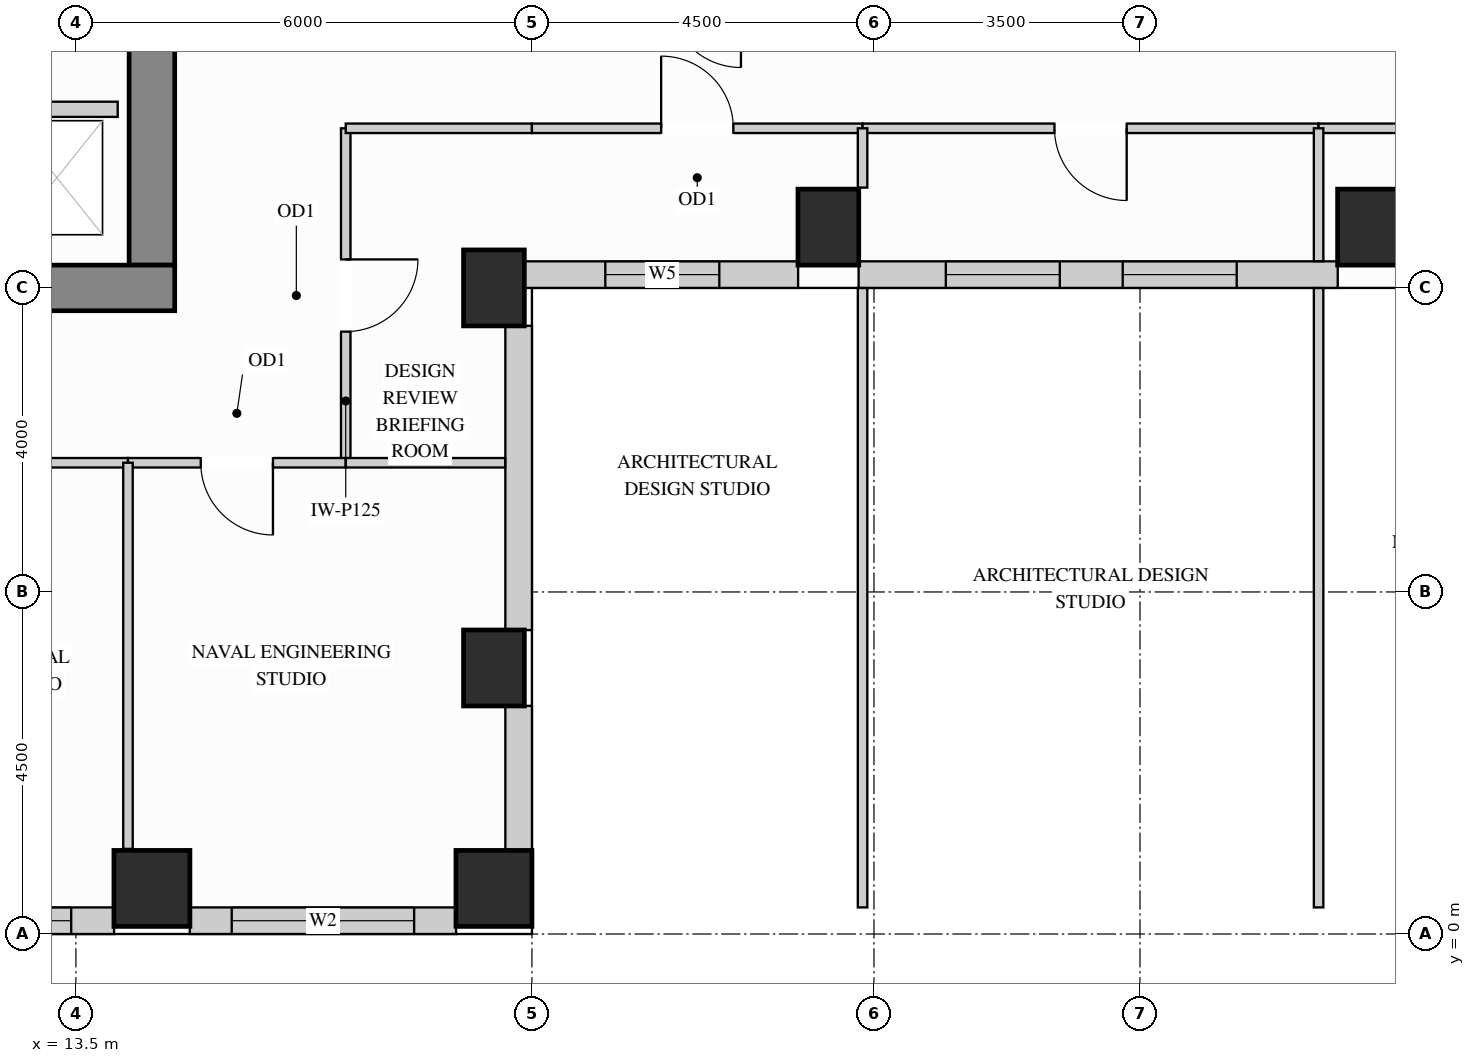
"""IFC4 building model, lengths in metres.
Left out: names, types, materials, properties, quantities, classifications, styles, units other than length and angle.
Written with IfcOpenShell. Run it as: python <this file> out.ifc"""

import sys

from ifc_helpers import new_model, si_unit, direction, frame, frame_2d, origin, origin_2d, place, context, subcontext, project, spatial, rectangle, extrude, source, transform, mapped, element, fill, save


model = new_model("IFC4")
c1 = context("Model", 3, precision=1e-05, world=origin(), true_north=direction((0.0, 1.0)))
c2 = subcontext(c1, "Body", "Model", "MODEL_VIEW")
j1 = project(units=[si_unit("LENGTHUNIT", "METRE"), si_unit("PLANEANGLEUNIT", "RADIAN")], contexts=[c1])
p1 = place(None, origin())
s1 = spatial("IfcSite", under=j1, at=p1, CompositionType="ELEMENT")
p2 = place(p1, origin())
s2 = spatial("IfcBuilding", under=s1, at=p2, CompositionType="ELEMENT")
p3 = place(p2, frame((0.0, 0.0, 175.5)))
s3 = spatial("IfcBuildingStorey", under=s2, at=p3, CompositionType="ELEMENT", Elevation=175.5)
m1 = source(origin(), c2, "Body", "SweptSolid", [
    extrude(rectangle(XDim=0.8, YDim=1.0, at=origin_2d()), origin(), (0.0, 0.0, 1.0), 3.4),
])
for number, where, z_axis, x_axis in (
    (1, (19.0, 3.5, 0.0), (0.0, 0.0, 1.0), (1.0, 0.0, 0.0)),
    (2, (19.0, 8.5, 0.0), (0.0, 0.0, 1.0), (1.0, 0.0, 0.0)),
    (3, (23.4, 9.3, 0.0), (0.0, 0.0, 1.0), (1.0, 0.0, 0.0)),
    (4, (30.5, 9.3, 0.0), (0.0, 0.0, 1.0), (1.0, 0.0, 0.0)),
):
    element("IfcColumn", number, at=place(p3, frame(where, z_axis=z_axis, x_axis=x_axis)), inside=s3, PredefinedType="COLUMN", context=c2, shape_type="MappedRepresentation", body=[
        mapped(m1, transform((0.0, 0.0, 0.0), x_axis=(1.0, 0.0, 0.0), y_axis=(0.0, 1.0, 0.0), z_axis=(0.0, 0.0, 1.0))),
    ])
m2 = source(origin(), c2, "Body", "SweptSolid", [
    extrude(rectangle(XDim=1.0, YDim=1.0, at=origin_2d()), origin(), (0.0, 0.0, 1.0), 3.4),
])
for number, where, z_axis, x_axis in (
    (5, (14.5, 0.6, 0.0), (0.0, 0.0, 1.0), (1.0, 0.0, 0.0)),
    (6, (19.0, 0.6, 0.0), (0.0, 0.0, 1.0), (1.0, 0.0, 0.0)),
):
    element("IfcColumn", number, at=place(p3, frame(where, z_axis=z_axis, x_axis=x_axis)), inside=s3, PredefinedType="COLUMN", context=c2, shape_type="MappedRepresentation", body=[
        mapped(m2, transform((0.0, 0.0, 0.0), x_axis=(1.0, 0.0, 0.0), y_axis=(0.0, 1.0, 0.0), z_axis=(0.0, 0.0, 1.0))),
    ])
m3 = source(origin(), c2, "Body", "SweptSolid", [
    extrude(rectangle(XDim=10.02, YDim=0.6, at=frame_2d((5.01, 0.0))), origin(), (0.0, 0.0, 1.0), 3.4),
])
p4 = place(p3, frame((14.5, 8.8, 0.0), z_axis=(0.0, 0.0, 1.0), x_axis=(0.0, 1.0, 0.0)))
e7 = element("IfcWall", 7, at=p4, inside=s3, PredefinedType="SHEAR", context=c2, shape_type="MappedRepresentation", body=[
    mapped(m3, transform((0.0, 0.0, 0.0), x_axis=(1.0, 0.0, 0.0), y_axis=(0.0, 1.0, 0.0), z_axis=(0.0, 0.0, 1.0))),
])
m4 = source(origin(), c2, "Body", "SweptSolid", [
    extrude(rectangle(XDim=10.6, YDim=0.6, at=frame_2d((5.3, 0.0))), origin(), (0.0, 0.0, 1.0), 3.4),
])
p5 = place(p3, frame((4.2, 8.5, 0.0), z_axis=(0.0, 0.0, 1.0), x_axis=(1.0, 0.0, 0.0)))
e8 = element("IfcWall", 8, at=p5, inside=s3, PredefinedType="SHEAR", context=c2, shape_type="MappedRepresentation", body=[
    mapped(m4, transform((0.0, 0.0, 0.0), x_axis=(1.0, 0.0, 0.0), y_axis=(0.0, 1.0, 0.0), z_axis=(0.0, 0.0, 1.0))),
])
p6 = place(p3, frame((9.498, 0.175, 0.0), z_axis=(0.0, 0.0, 1.0), x_axis=(1.0, 0.0, 0.0)))
e9 = element("IfcWall", 9, at=p6, inside=s3, PredefinedType="SOLIDWALL", context=c2, shape_type="SweptSolid", body=[
    extrude(rectangle(XDim=4.504, YDim=0.35, at=frame_2d((2.252, 0.0))), origin(), (0.0, 0.0, 1.0), 2.612),
])
p7 = place(p6, frame((1.54, 0.0, 0.78)))
e10 = element("IfcOpeningElement", 10, at=p7, cuts=e9, PredefinedType="OPENING", context=c2, shape_type="SweptSolid", body=[
    extrude(rectangle(XDim=2.4, YDim=1.652, at=frame_2d((1.2, 0.826))), frame((0.0, 0.185, 0.0), z_axis=(0.0, -1.0, 0.0), x_axis=(1.0, 0.0, 0.0)), (0.0, 0.0, 1.0), 0.37),
])
p8 = place(p3, frame((14.998, 0.175, 0.0), z_axis=(0.0, 0.0, 1.0), x_axis=(1.0, 0.0, 0.0)))
e11 = element("IfcWall", 11, at=p8, inside=s3, PredefinedType="SOLIDWALL", context=c2, shape_type="SweptSolid", body=[
    extrude(rectangle(XDim=3.504, YDim=0.35, at=frame_2d((1.752, 0.0))), origin(), (0.0, 0.0, 1.0), 2.612),
])
p9 = place(p8, frame((0.552, 0.0, 0.78)))
e12 = element("IfcOpeningElement", 12, at=p9, cuts=e11, PredefinedType="OPENING", context=c2, shape_type="SweptSolid", body=[
    extrude(rectangle(XDim=2.4, YDim=1.652, at=frame_2d((1.2, 0.826))), frame((0.0, 0.185, 0.0), z_axis=(0.0, -1.0, 0.0), x_axis=(1.0, 0.0, 0.0)), (0.0, 0.0, 1.0), 0.37),
])
m5 = source(origin(), c2, "Body", "SweptSolid", [
    extrude(rectangle(XDim=1.904, YDim=0.35, at=frame_2d((0.952, 0.0))), origin(), (0.0, 0.0, 1.0), 2.612),
])
p10 = place(p3, frame((19.325, 1.098, 0.0), z_axis=(0.0, 0.0, 1.0), x_axis=(0.0, 1.0, 0.0)))
e13 = element("IfcWall", 13, at=p10, inside=s3, PredefinedType="SOLIDWALL", context=c2, shape_type="MappedRepresentation", body=[
    mapped(m5, transform((0.0, 0.0, 0.0), x_axis=(1.0, 0.0, 0.0), y_axis=(0.0, 1.0, 0.0), z_axis=(0.0, 0.0, 1.0))),
])
m6 = source(origin(), c2, "Body", "SweptSolid", [
    extrude(rectangle(XDim=4.004, YDim=0.35, at=frame_2d((2.002, 0.0))), origin(), (0.0, 0.0, 1.0), 2.612),
])
p11 = place(p3, frame((19.325, 3.998, 0.0), z_axis=(0.0, 0.0, 1.0), x_axis=(0.0, 1.0, 0.0)))
e14 = element("IfcWall", 14, at=p11, inside=s3, PredefinedType="SOLIDWALL", context=c2, shape_type="MappedRepresentation", body=[
    mapped(m6, transform((0.0, 0.0, 0.0), x_axis=(1.0, 0.0, 0.0), y_axis=(0.0, 1.0, 0.0), z_axis=(0.0, 0.0, 1.0))),
])
p12 = place(p3, frame((19.398, 8.675, 0.0), z_axis=(0.0, 0.0, 1.0), x_axis=(1.0, 0.0, 0.0)))
e15 = element("IfcWall", 15, at=p12, inside=s3, PredefinedType="SOLIDWALL", context=c2, shape_type="SweptSolid", body=[
    extrude(rectangle(XDim=3.604, YDim=0.35, at=frame_2d((1.802, 0.0))), origin(), (0.0, 0.0, 1.0), 3.385),
])
p13 = place(p12, frame((1.067, 0.0, 0.78)))
e16 = element("IfcOpeningElement", 16, at=p13, cuts=e15, PredefinedType="OPENING", context=c2, shape_type="SweptSolid", body=[
    extrude(rectangle(XDim=1.5, YDim=2.0, at=frame_2d((0.75, 1.0))), frame((0.0, 0.185, 0.0), z_axis=(0.0, -1.0, 0.0), x_axis=(1.0, 0.0, 0.0)), (0.0, 0.0, 1.0), 0.37),
])
p14 = place(p3, frame((23.798, 8.675, 0.0), z_axis=(0.0, 0.0, 1.0), x_axis=(1.0, 0.0, 0.0)))
e17 = element("IfcWall", 17, at=p14, inside=s3, PredefinedType="SOLIDWALL", context=c2, shape_type="SweptSolid", body=[
    extrude(rectangle(XDim=6.304, YDim=0.35, at=frame_2d((3.152, 0.0))), origin(), (0.0, 0.0, 1.0), 3.385),
])
p15 = place(p14, frame((1.147, 0.0, 0.78)))
e18 = element("IfcOpeningElement", 18, at=p15, cuts=e17, PredefinedType="OPENING", context=c2, shape_type="SweptSolid", body=[
    extrude(rectangle(XDim=1.5, YDim=2.0, at=frame_2d((0.75, 1.0))), frame((0.0, 0.185, 0.0), z_axis=(0.0, -1.0, 0.0), x_axis=(1.0, 0.0, 0.0)), (0.0, 0.0, 1.0), 0.37),
])
p16 = place(p14, frame((3.475, 0.0, 0.78)))
e19 = element("IfcOpeningElement", 19, at=p16, cuts=e17, PredefinedType="OPENING", context=c2, shape_type="SweptSolid", body=[
    extrude(rectangle(XDim=1.5, YDim=2.0, at=frame_2d((0.75, 1.0))), frame((0.0, 0.185, 0.0), z_axis=(0.0, -1.0, 0.0), x_axis=(1.0, 0.0, 0.0)), (0.0, 0.0, 1.0), 0.37),
])
p17 = place(p3, frame((17.05, 6.2, 0.0), z_axis=(0.0, 0.0, 1.0), x_axis=(0.0, 1.0, 0.0)))
e20 = element("IfcWall", 20, at=p17, inside=s3, PredefinedType="PARTITIONING", context=c2, shape_type="SweptSolid", body=[
    extrude(rectangle(XDim=4.4, YDim=0.125, at=frame_2d((2.2, 0.0))), origin(), (0.0, 0.0, 1.0), 3.385),
])
p18 = place(p17, frame((1.725, 0.0, 0.0)))
e21 = element("IfcOpeningElement", 21, at=p18, cuts=e20, PredefinedType="OPENING", context=c2, shape_type="SweptSolid", body=[
    extrude(rectangle(XDim=0.95, YDim=2.15, at=frame_2d((0.475, 1.075))), frame((0.0, 0.073, 0.0), z_axis=(0.0, -1.0, 0.0), x_axis=(1.0, 0.0, 0.0)), (0.0, 0.0, 1.0), 0.145),
])
m7 = source(origin(), c2, "Body", "SweptSolid", [
    extrude(rectangle(XDim=2.45, YDim=0.125, at=frame_2d((1.225, 0.0))), origin(), (0.0, 0.0, 1.0), 3.385),
])
p19 = place(p3, frame((17.05, 10.6, 0.0), z_axis=(0.0, 0.0, 1.0), x_axis=(1.0, 0.0, 0.0)))
e22 = element("IfcWall", 22, at=p19, inside=s3, PredefinedType="PARTITIONING", context=c2, shape_type="MappedRepresentation", body=[
    mapped(m7, transform((0.0, 0.0, 0.0), x_axis=(1.0, 0.0, 0.0), y_axis=(0.0, 1.0, 0.0), z_axis=(0.0, 0.0, 1.0))),
])
p20 = place(p3, frame((19.5, 10.6, 0.0), z_axis=(0.0, 0.0, 1.0), x_axis=(1.0, 0.0, 0.0)))
e23 = element("IfcWall", 23, at=p20, inside=s3, PredefinedType="PARTITIONING", context=c2, shape_type="SweptSolid", body=[
    extrude(rectangle(XDim=4.35, YDim=0.125, at=frame_2d((2.175, 0.0))), origin(), (0.0, 0.0, 1.0), 3.385),
])
p21 = place(p20, frame((1.7, 0.0, 0.0)))
e24 = element("IfcOpeningElement", 24, at=p21, cuts=e23, PredefinedType="OPENING", context=c2, shape_type="SweptSolid", body=[
    extrude(rectangle(XDim=0.95, YDim=2.15, at=frame_2d((0.475, 1.075))), frame((0.0, 0.073, 0.0), z_axis=(0.0, -1.0, 0.0), x_axis=(1.0, 0.0, 0.0)), (0.0, 0.0, 1.0), 0.145),
])
p22 = place(p3, frame((23.85, 10.6, 0.0), z_axis=(0.0, 0.0, 1.0), x_axis=(1.0, 0.0, 0.0)))
e25 = element("IfcWall", 25, at=p22, inside=s3, PredefinedType="PARTITIONING", context=c2, shape_type="SweptSolid", body=[
    extrude(rectangle(XDim=6.0, YDim=0.125, at=frame_2d((3.0, 0.0))), origin(), (0.0, 0.0, 1.0), 3.385),
])
p23 = place(p22, frame((2.525, 0.0, 0.0)))
e26 = element("IfcOpeningElement", 26, at=p23, cuts=e25, PredefinedType="OPENING", context=c2, shape_type="SweptSolid", body=[
    extrude(rectangle(XDim=0.95, YDim=2.15, at=frame_2d((0.475, 1.075))), frame((0.0, 0.073, 0.0), z_axis=(0.0, -1.0, 0.0), x_axis=(1.0, 0.0, 0.0)), (0.0, 0.0, 1.0), 0.145),
])
p24 = place(p3, frame((29.85, 10.6, 0.0), z_axis=(0.0, 0.0, 1.0), x_axis=(1.0, 0.0, 0.0)))
e27 = element("IfcWall", 27, at=p24, inside=s3, PredefinedType="PARTITIONING", context=c2, shape_type="SweptSolid", body=[
    extrude(rectangle(XDim=4.55, YDim=0.125, at=frame_2d((2.275, 0.0))), origin(), (0.0, 0.0, 1.0), 3.385),
])
p25 = place(p24, frame((1.8, 0.0, 0.0)))
e28 = element("IfcOpeningElement", 28, at=p25, cuts=e27, PredefinedType="OPENING", context=c2, shape_type="SweptSolid", body=[
    extrude(rectangle(XDim=0.95, YDim=2.15, at=frame_2d((0.475, 1.075))), frame((0.0, 0.073, 0.0), z_axis=(0.0, -1.0, 0.0), x_axis=(1.0, 0.0, 0.0)), (0.0, 0.0, 1.0), 0.145),
])
m8 = source(origin(), c2, "Body", "SweptSolid", [
    extrude(rectangle(XDim=8.148, YDim=0.125, at=frame_2d((4.074, 0.0))), origin(), (0.0, 0.0, 1.0), 3.385),
])
p26 = place(p3, frame((23.85, 0.35, 0.0), z_axis=(0.0, 0.0, 1.0), x_axis=(0.0, 1.0, 0.0)))
e29 = element("IfcWall", 29, at=p26, inside=s3, PredefinedType="PARTITIONING", context=c2, shape_type="MappedRepresentation", body=[
    mapped(m8, transform((0.0, 0.0, 0.0), x_axis=(1.0, 0.0, 0.0), y_axis=(0.0, 1.0, 0.0), z_axis=(0.0, 0.0, 1.0))),
])
m9 = source(origin(), c2, "Body", "SweptSolid", [
    extrude(rectangle(XDim=0.78, YDim=0.125, at=frame_2d((0.39, 0.0))), origin(), (0.0, 0.0, 1.0), 3.385),
])
p27 = place(p3, frame((23.85, 9.82, 0.0), z_axis=(0.0, 0.0, 1.0), x_axis=(0.0, 1.0, 0.0)))
e30 = element("IfcWall", 30, at=p27, inside=s3, PredefinedType="PARTITIONING", context=c2, shape_type="MappedRepresentation", body=[
    mapped(m9, transform((0.0, 0.0, 0.0), x_axis=(1.0, 0.0, 0.0), y_axis=(0.0, 1.0, 0.0), z_axis=(0.0, 0.0, 1.0))),
])
p28 = place(p3, frame((29.85, 0.35, 0.0), z_axis=(0.0, 0.0, 1.0), x_axis=(0.0, 1.0, 0.0)))
e31 = element("IfcWall", 31, at=p28, inside=s3, PredefinedType="PARTITIONING", context=c2, shape_type="MappedRepresentation", body=[
    mapped(m8, transform((0.0, 0.0, 0.0), x_axis=(1.0, 0.0, 0.0), y_axis=(0.0, 1.0, 0.0), z_axis=(0.0, 0.0, 1.0))),
])
m10 = source(origin(), c2, "Body", "SweptSolid", [
    extrude(rectangle(XDim=1.748, YDim=0.125, at=frame_2d((0.874, 0.0))), origin(), (0.0, 0.0, 1.0), 3.385),
])
p29 = place(p3, frame((29.85, 8.852, 0.0), z_axis=(0.0, 0.0, 1.0), x_axis=(0.0, 1.0, 0.0)))
e32 = element("IfcWall", 32, at=p29, inside=s3, PredefinedType="PARTITIONING", context=c2, shape_type="MappedRepresentation", body=[
    mapped(m10, transform((0.0, 0.0, 0.0), x_axis=(1.0, 0.0, 0.0), y_axis=(0.0, 1.0, 0.0), z_axis=(0.0, 0.0, 1.0))),
])
p30 = place(p3, frame((10.544, 6.2, 0.0), z_axis=(0.0, 0.0, 1.0), x_axis=(1.0, 0.0, 0.0)))
e33 = element("IfcWall", 33, at=p30, inside=s3, PredefinedType="PARTITIONING", context=c2, shape_type="SweptSolid", body=[
    extrude(rectangle(XDim=3.641, YDim=0.125, at=frame_2d((1.821, 0.0))), origin(), (0.0, 0.0, 1.0), 2.848),
])
p31 = place(p30, frame((1.345, 0.0, 0.0)))
e34 = element("IfcOpeningElement", 34, at=p31, cuts=e33, PredefinedType="OPENING", context=c2, shape_type="SweptSolid", body=[
    extrude(rectangle(XDim=0.95, YDim=2.15, at=frame_2d((0.475, 1.075))), frame((0.0, 0.073, 0.0), z_axis=(0.0, -1.0, 0.0), x_axis=(1.0, 0.0, 0.0)), (0.0, 0.0, 1.0), 0.145),
])
p32 = place(p3, frame((14.185, 6.2, 0.0), z_axis=(0.0, 0.0, 1.0), x_axis=(1.0, 0.0, 0.0)))
e35 = element("IfcWall", 35, at=p32, inside=s3, PredefinedType="PARTITIONING", context=c2, shape_type="SweptSolid", body=[
    extrude(rectangle(XDim=2.865, YDim=0.125, at=frame_2d((1.433, 0.0))), origin(), (0.0, 0.0, 1.0), 2.848),
])
p33 = place(p32, frame((0.958, 0.0, 0.0)))
e36 = element("IfcOpeningElement", 36, at=p33, cuts=e35, PredefinedType="OPENING", context=c2, shape_type="SweptSolid", body=[
    extrude(rectangle(XDim=0.95, YDim=2.15, at=frame_2d((0.475, 1.075))), frame((0.0, 0.073, 0.0), z_axis=(0.0, -1.0, 0.0), x_axis=(1.0, 0.0, 0.0)), (0.0, 0.0, 1.0), 0.145),
])
m11 = source(origin(), c2, "Body", "SweptSolid", [
    extrude(rectangle(XDim=2.098, YDim=0.125, at=frame_2d((1.049, 0.0))), origin(), (0.0, 0.0, 1.0), 2.848),
])
p34 = place(p3, frame((17.05, 6.2, 0.0), z_axis=(0.0, 0.0, 1.0), x_axis=(1.0, 0.0, 0.0)))
e37 = element("IfcWall", 37, at=p34, inside=s3, PredefinedType="PARTITIONING", context=c2, shape_type="MappedRepresentation", body=[
    mapped(m11, transform((0.0, 0.0, 0.0), x_axis=(1.0, 0.0, 0.0), y_axis=(0.0, 1.0, 0.0), z_axis=(0.0, 0.0, 1.0))),
])
m12 = source(origin(), c2, "Body", "SweptSolid", [
    extrude(rectangle(XDim=5.08, YDim=0.125, at=frame_2d((2.54, 0.0))), origin(), (0.0, 0.0, 1.0), 3.385),
])
p35 = place(p3, frame((14.185, 1.12, 0.0), z_axis=(0.0, 0.0, 1.0), x_axis=(0.0, 1.0, 0.0)))
e38 = element("IfcWall", 38, at=p35, inside=s3, PredefinedType="PARTITIONING", context=c2, shape_type="MappedRepresentation", body=[
    mapped(m12, transform((0.0, 0.0, 0.0), x_axis=(1.0, 0.0, 0.0), y_axis=(0.0, 1.0, 0.0), z_axis=(0.0, 0.0, 1.0))),
])
m13 = source(origin(), c2, "Body", "SweptSolid", [
    extrude(rectangle(XDim=1.63, YDim=0.2, at=frame_2d((0.815, 0.0))), origin(), (0.0, 0.0, 1.0), 3.385),
])
p36 = place(p3, frame((12.42, 10.85, 0.0), z_axis=(0.0, 0.0, 1.0), x_axis=(1.0, 0.0, 0.0)))
e39 = element("IfcWall", 39, at=p36, inside=s3, PredefinedType="PARTITIONING", context=c2, shape_type="MappedRepresentation", body=[
    mapped(m13, transform((0.0, 0.0, 0.0), x_axis=(1.0, 0.0, 0.0), y_axis=(0.0, 1.0, 0.0), z_axis=(0.0, 0.0, 1.0))),
])
m14 = source(origin(), c2, "Body", "SweptSolid", [
    extrude(rectangle(XDim=0.95, YDim=2.15, at=frame_2d((0.475, 1.075))), frame((0.0, 0.025, 0.0), z_axis=(0.0, -1.0, 0.0), x_axis=(1.0, 0.0, 0.0)), (0.0, 0.0, 1.0), 0.05),
])
p37 = place(p18, origin())
e40 = element("IfcDoor", 40, at=p37, inside=s3, OperationType="SINGLE_SWING_RIGHT", PredefinedType="DOOR", context=c2, shape_type="MappedRepresentation", body=[
    mapped(m14, transform((0.0, 0.0, 0.0), x_axis=(1.0, 0.0, 0.0), y_axis=(0.0, 1.0, 0.0), z_axis=(0.0, 0.0, 1.0))),
])
fill(e21, e40)
p38 = place(p33, origin())
e41 = element("IfcDoor", 41, at=p38, inside=s3, OperationType="SINGLE_SWING_RIGHT", PredefinedType="DOOR", context=c2, shape_type="MappedRepresentation", body=[
    mapped(m14, transform((0.0, 0.0, 0.0), x_axis=(1.0, 0.0, 0.0), y_axis=(0.0, 1.0, 0.0), z_axis=(0.0, 0.0, 1.0))),
])
fill(e36, e41)
p39 = place(p21, origin())
e42 = element("IfcDoor", 42, at=p39, inside=s3, OperationType="SINGLE_SWING_LEFT", PredefinedType="DOOR", context=c2, shape_type="MappedRepresentation", body=[
    mapped(m14, transform((0.0, 0.0, 0.0), x_axis=(1.0, 0.0, 0.0), y_axis=(0.0, 1.0, 0.0), z_axis=(0.0, 0.0, 1.0))),
])
fill(e24, e42)
p40 = place(p23, origin())
e43 = element("IfcDoor", 43, at=p40, inside=s3, OperationType="SINGLE_SWING_RIGHT", PredefinedType="DOOR", context=c2, shape_type="MappedRepresentation", body=[
    mapped(m14, transform((0.0, 0.0, 0.0), x_axis=(1.0, 0.0, 0.0), y_axis=(0.0, 1.0, 0.0), z_axis=(0.0, 0.0, 1.0))),
])
fill(e26, e43)
m15 = source(origin(), c2, "Body", "SweptSolid", [
    extrude(rectangle(XDim=2.4, YDim=1.652, at=frame_2d((1.2, 0.826))), frame((0.0, 0.03, 0.0), z_axis=(0.0, -1.0, 0.0), x_axis=(1.0, 0.0, 0.0)), (0.0, 0.0, 1.0), 0.06),
])
p41 = place(p7, origin())
e44 = element("IfcWindow", 44, at=p41, inside=s3, PartitioningType="SINGLE_PANEL", PredefinedType="WINDOW", context=c2, shape_type="MappedRepresentation", body=[
    mapped(m15, transform((0.0, 0.0, 0.0), x_axis=(1.0, 0.0, 0.0), y_axis=(0.0, 1.0, 0.0), z_axis=(0.0, 0.0, 1.0))),
])
fill(e10, e44)
p42 = place(p9, origin())
e45 = element("IfcWindow", 45, at=p42, inside=s3, PartitioningType="SINGLE_PANEL", PredefinedType="WINDOW", context=c2, shape_type="MappedRepresentation", body=[
    mapped(m15, transform((0.0, 0.0, 0.0), x_axis=(1.0, 0.0, 0.0), y_axis=(0.0, 1.0, 0.0), z_axis=(0.0, 0.0, 1.0))),
])
fill(e12, e45)
m16 = source(origin(), c2, "Body", "SweptSolid", [
    extrude(rectangle(XDim=1.5, YDim=2.0, at=frame_2d((0.75, 1.0))), frame((0.0, 0.03, 0.0), z_axis=(0.0, -1.0, 0.0), x_axis=(1.0, 0.0, 0.0)), (0.0, 0.0, 1.0), 0.06),
])
p43 = place(p13, origin())
e46 = element("IfcWindow", 46, at=p43, inside=s3, PartitioningType="SINGLE_PANEL", PredefinedType="WINDOW", context=c2, shape_type="MappedRepresentation", body=[
    mapped(m16, transform((0.0, 0.0, 0.0), x_axis=(1.0, 0.0, 0.0), y_axis=(0.0, 1.0, 0.0), z_axis=(0.0, 0.0, 1.0))),
])
fill(e16, e46)
p44 = place(p15, origin())
e47 = element("IfcWindow", 47, at=p44, inside=s3, PartitioningType="SINGLE_PANEL", PredefinedType="WINDOW", context=c2, shape_type="MappedRepresentation", body=[
    mapped(m16, transform((0.0, 0.0, 0.0), x_axis=(1.0, 0.0, 0.0), y_axis=(0.0, 1.0, 0.0), z_axis=(0.0, 0.0, 1.0))),
])
fill(e18, e47)
p45 = place(p16, origin())
e48 = element("IfcWindow", 48, at=p45, inside=s3, PartitioningType="SINGLE_PANEL", PredefinedType="WINDOW", context=c2, shape_type="MappedRepresentation", body=[
    mapped(m16, transform((0.0, 0.0, 0.0), x_axis=(1.0, 0.0, 0.0), y_axis=(0.0, 1.0, 0.0), z_axis=(0.0, 0.0, 1.0))),
])
fill(e19, e48)
save(model, sys.argv[1])
